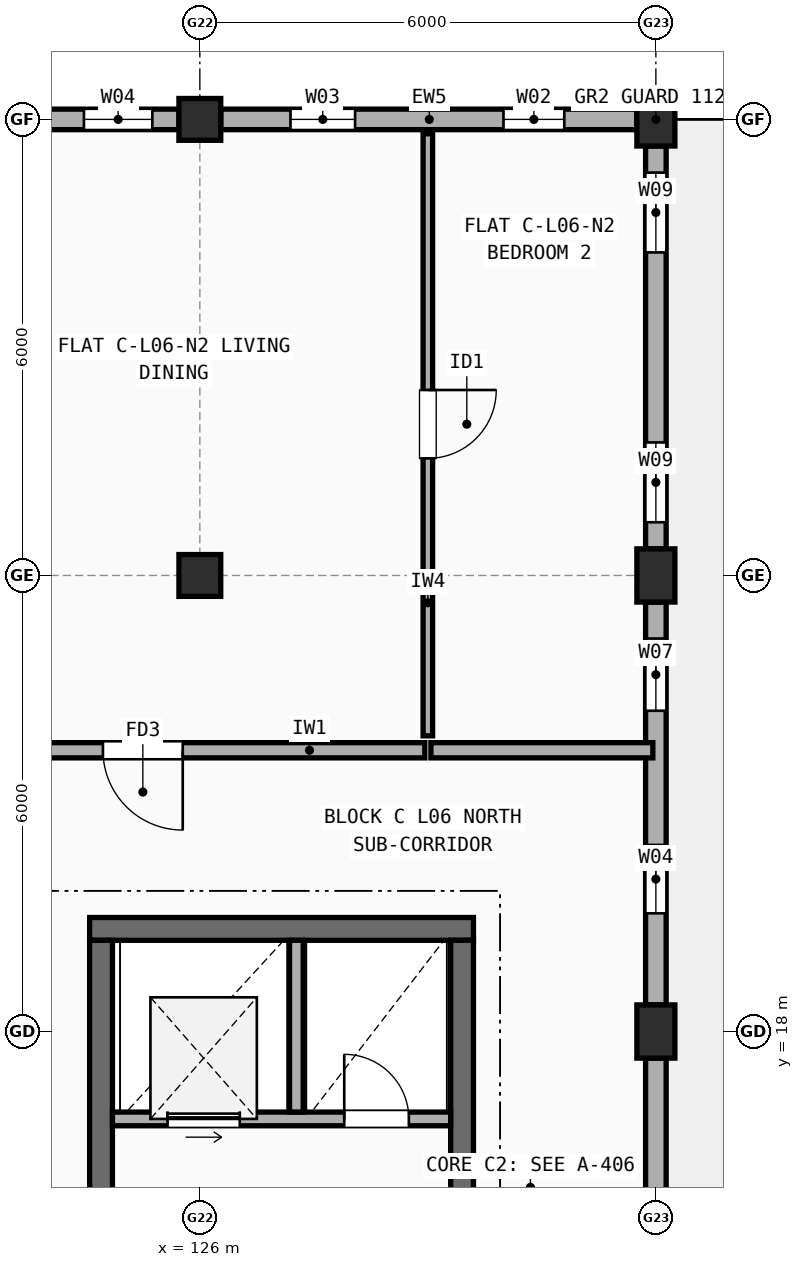
"""IFC4 building model, lengths in metres.
Left out: names, types, materials, properties, quantities, classifications, styles, units other than length and angle.
Written with IfcOpenShell. Run it as: python <this file> out.ifc"""

import sys

from ifc_helpers import new_model, si_unit, direction, frame, frame_2d, origin, origin_2d, place, context, subcontext, project, spatial, rectangle, extrude, element, fill, save


model = new_model("IFC4")
c1 = context("Model", 3, precision=1e-05, world=origin(), true_north=direction((0.0, 1.0)))
c2 = subcontext(c1, "Body", "Model", "MODEL_VIEW")
j1 = project(units=[si_unit("LENGTHUNIT", "METRE"), si_unit("PLANEANGLEUNIT", "RADIAN")], contexts=[c1])
p1 = place(None, origin())
s1 = spatial("IfcSite", under=j1, at=p1, CompositionType="ELEMENT")
p2 = place(p1, origin())
s2 = spatial("IfcBuilding", under=s1, at=p2, CompositionType="ELEMENT")
p3 = place(p2, frame((0.0, 0.0, 20.5)))
s3 = spatial("IfcBuildingStorey", under=s2, at=p3, CompositionType="ELEMENT", Elevation=20.5)
for number, where, z_axis, x_axis in (
    (1, (126.0, 24.0, 0.0), (0.0, 0.0, 1.0), (1.0, 0.0, 0.0)),
    (2, (126.0, 30.0, 0.0), (0.0, 0.0, 1.0), (1.0, 0.0, 0.0)),
):
    element("IfcColumn", number, at=place(p3, frame(where, z_axis=z_axis, x_axis=x_axis)), inside=s3, PredefinedType="COLUMN", context=c2, shape_type="SweptSolid", body=[
        extrude(rectangle(XDim=0.55, YDim=0.55, at=origin_2d()), origin(), (0.0, 0.0, 1.0), 2.97),
    ])
for number, where, z_axis, x_axis in (
    (3, (132.0, 18.0, 0.0), (0.0, 0.0, 1.0), (1.0, 0.0, 0.0)),
    (4, (132.0, 24.0, 0.0), (0.0, 0.0, 1.0), (1.0, 0.0, 0.0)),
    (5, (132.0, 30.0, 0.0), (0.0, 0.0, 1.0), (1.0, 0.0, 0.0)),
):
    element("IfcColumn", number, at=place(p3, frame(where, z_axis=z_axis, x_axis=x_axis)), inside=s3, PredefinedType="COLUMN", context=c2, shape_type="SweptSolid", body=[
        extrude(rectangle(XDim=0.5, YDim=0.7, at=origin_2d()), origin(), (0.0, 0.0, 1.0), 2.97),
    ])
p4 = place(p3, frame((132.0, 12.35, 0.0), z_axis=(0.0, 0.0, 1.0), x_axis=(0.0, 1.0, 0.0)))
e6 = element("IfcWall", 6, at=p4, inside=s3, PredefinedType="STANDARD", context=c2, shape_type="SweptSolid", body=[
    extrude(rectangle(XDim=5.3, YDim=0.27, at=frame_2d((2.65, 0.0))), origin(), (0.0, 0.0, 1.0), 2.452),
])
p5 = place(p4, frame((1.925, 0.0, 0.0)))
e7 = element("IfcOpeningElement", 7, at=p5, cuts=e6, PredefinedType="OPENING", context=c2, shape_type="SweptSolid", body=[
    extrude(rectangle(XDim=1.45, YDim=2.15, at=frame_2d((0.725, 1.075))), frame((0.0, 0.145, 0.0), z_axis=(0.0, -1.0, 0.0), x_axis=(1.0, 0.0, 0.0)), (0.0, 0.0, 1.0), 0.29),
])
p6 = place(p3, frame((132.0, 18.35, 0.0), z_axis=(0.0, 0.0, 1.0), x_axis=(0.0, 1.0, 0.0)))
e8 = element("IfcWall", 8, at=p6, inside=s3, PredefinedType="STANDARD", context=c2, shape_type="SweptSolid", body=[
    extrude(rectangle(XDim=5.3, YDim=0.27, at=frame_2d((2.65, 0.0))), origin(), (0.0, 0.0, 1.0), 2.452),
])
p7 = place(p6, frame((1.205, 0.0, 0.9)))
e9 = element("IfcOpeningElement", 9, at=p7, cuts=e8, PredefinedType="OPENING", context=c2, shape_type="SweptSolid", body=[
    extrude(rectangle(XDim=0.9, YDim=1.3, at=frame_2d((0.45, 0.65))), frame((0.0, 0.145, 0.0), z_axis=(0.0, -1.0, 0.0), x_axis=(1.0, 0.0, 0.0)), (0.0, 0.0, 1.0), 0.29),
])
p8 = place(p6, frame((3.87, 0.0, 0.9)))
e10 = element("IfcOpeningElement", 10, at=p8, cuts=e8, PredefinedType="OPENING", context=c2, shape_type="SweptSolid", body=[
    extrude(rectangle(XDim=0.95, YDim=1.35, at=frame_2d((0.475, 0.675))), frame((0.0, 0.145, 0.0), z_axis=(0.0, -1.0, 0.0), x_axis=(1.0, 0.0, 0.0)), (0.0, 0.0, 1.0), 0.29),
])
p9 = place(p3, frame((132.0, 24.35, 0.0), z_axis=(0.0, 0.0, 1.0), x_axis=(0.0, 1.0, 0.0)))
e11 = element("IfcWall", 11, at=p9, inside=s3, PredefinedType="STANDARD", context=c2, shape_type="SweptSolid", body=[
    extrude(rectangle(XDim=5.3, YDim=0.27, at=frame_2d((2.65, 0.0))), origin(), (0.0, 0.0, 1.0), 2.452),
])
p10 = place(p9, frame((0.35, 0.0, 0.9)))
e12 = element("IfcOpeningElement", 12, at=p10, cuts=e11, PredefinedType="OPENING", context=c2, shape_type="SweptSolid", body=[
    extrude(rectangle(XDim=1.05, YDim=1.35, at=frame_2d((0.525, 0.675))), frame((0.0, 0.145, 0.0), z_axis=(0.0, -1.0, 0.0), x_axis=(1.0, 0.0, 0.0)), (0.0, 0.0, 1.0), 0.29),
])
p11 = place(p9, frame((3.9, 0.0, 0.9)))
e13 = element("IfcOpeningElement", 13, at=p11, cuts=e11, PredefinedType="OPENING", context=c2, shape_type="SweptSolid", body=[
    extrude(rectangle(XDim=1.05, YDim=1.35, at=frame_2d((0.525, 0.675))), frame((0.0, 0.145, 0.0), z_axis=(0.0, -1.0, 0.0), x_axis=(1.0, 0.0, 0.0)), (0.0, 0.0, 1.0), 0.29),
])
p12 = place(p3, frame((131.75, 30.0, 0.0), z_axis=(0.0, 0.0, 1.0), x_axis=(-1.0, 0.0, 0.0)))
e14 = element("IfcWall", 14, at=p12, inside=s3, PredefinedType="STANDARD", context=c2, shape_type="SweptSolid", body=[
    extrude(rectangle(XDim=5.475, YDim=0.27, at=frame_2d((2.738, 0.0))), origin(), (0.0, 0.0, 1.0), 2.452),
])
p13 = place(p12, frame((0.955, 0.0, 0.9)))
e15 = element("IfcOpeningElement", 15, at=p13, cuts=e14, PredefinedType="OPENING", context=c2, shape_type="SweptSolid", body=[
    extrude(rectangle(XDim=0.8, YDim=1.2, at=frame_2d((0.4, 0.6))), frame((0.0, 0.145, 0.0), z_axis=(0.0, -1.0, 0.0), x_axis=(1.0, 0.0, 0.0)), (0.0, 0.0, 1.0), 0.29),
])
p14 = place(p12, frame((3.708, 0.0, 0.9)))
e16 = element("IfcOpeningElement", 16, at=p14, cuts=e14, PredefinedType="OPENING", context=c2, shape_type="SweptSolid", body=[
    extrude(rectangle(XDim=0.85, YDim=1.25, at=frame_2d((0.425, 0.625))), frame((0.0, 0.145, 0.0), z_axis=(0.0, -1.0, 0.0), x_axis=(1.0, 0.0, 0.0)), (0.0, 0.0, 1.0), 0.29),
])
p15 = place(p3, frame((125.725, 30.0, 0.0), z_axis=(0.0, 0.0, 1.0), x_axis=(-1.0, 0.0, 0.0)))
e17 = element("IfcWall", 17, at=p15, inside=s3, PredefinedType="STANDARD", context=c2, shape_type="SweptSolid", body=[
    extrude(rectangle(XDim=5.45, YDim=0.27, at=frame_2d((2.725, 0.0))), origin(), (0.0, 0.0, 1.0), 2.452),
])
p16 = place(p15, frame((0.35, 0.0, 0.9)))
e18 = element("IfcOpeningElement", 18, at=p16, cuts=e17, PredefinedType="OPENING", context=c2, shape_type="SweptSolid", body=[
    extrude(rectangle(XDim=0.9, YDim=1.3, at=frame_2d((0.45, 0.65))), frame((0.0, 0.145, 0.0), z_axis=(0.0, -1.0, 0.0), x_axis=(1.0, 0.0, 0.0)), (0.0, 0.0, 1.0), 0.29),
])
p17 = place(p15, frame((2.935, 0.0, 0.9)))
e19 = element("IfcOpeningElement", 19, at=p17, cuts=e17, PredefinedType="OPENING", context=c2, shape_type="SweptSolid", body=[
    extrude(rectangle(XDim=0.9, YDim=1.3, at=frame_2d((0.45, 0.65))), frame((0.0, 0.145, 0.0), z_axis=(0.0, -1.0, 0.0), x_axis=(1.0, 0.0, 0.0)), (0.0, 0.0, 1.0), 0.29),
])
p18 = place(p3, frame((129.6, 19.35, 0.0), z_axis=(0.0, 0.0, 1.0), x_axis=(-1.0, 0.0, 0.0)))
e20 = element("IfcWall", 20, at=p18, inside=s3, PredefinedType="SHEAR", context=c2, shape_type="SweptSolid", body=[
    extrude(rectangle(XDim=5.05, YDim=0.3, at=frame_2d((2.525, 0.0))), origin(), (0.0, 0.0, 1.0), 2.97),
])
p19 = place(p3, frame((129.45, 12.75, 0.0), z_axis=(0.0, 0.0, 1.0), x_axis=(0.0, 1.0, 0.0)))
e21 = element("IfcWall", 21, at=p19, inside=s3, PredefinedType="SHEAR", context=c2, shape_type="SweptSolid", body=[
    extrude(rectangle(XDim=6.45, YDim=0.3, at=frame_2d((3.225, 0.0))), origin(), (0.0, 0.0, 1.0), 2.97),
])
p20 = place(p3, frame((124.7, 15.65, 0.0), z_axis=(0.0, 0.0, 1.0), x_axis=(0.0, 1.0, 0.0)))
e22 = element("IfcWall", 22, at=p20, inside=s3, PredefinedType="SHEAR", context=c2, shape_type="SweptSolid", body=[
    extrude(rectangle(XDim=3.55, YDim=0.3, at=frame_2d((1.775, 0.0))), origin(), (0.0, 0.0, 1.0), 2.97),
])
p21 = place(p3, frame((124.85, 16.85, 0.0), z_axis=(0.0, 0.0, 1.0), x_axis=(1.0, 0.0, 0.0)))
e23 = element("IfcWall", 23, at=p21, inside=s3, PredefinedType="SOLIDWALL", context=c2, shape_type="SweptSolid", body=[
    extrude(rectangle(XDim=4.45, YDim=0.18, at=frame_2d((2.225, 0.0))), origin(), (0.0, 0.0, 1.0), 2.97),
])
p22 = place(p21, frame((0.725, 0.0, 0.0)))
e24 = element("IfcOpeningElement", 24, at=p22, cuts=e23, PredefinedType="OPENING", context=c2, shape_type="SweptSolid", body=[
    extrude(rectangle(XDim=0.95, YDim=2.15, at=frame_2d((0.475, 1.075))), frame((0.0, 0.1, 0.0), z_axis=(0.0, -1.0, 0.0), x_axis=(1.0, 0.0, 0.0)), (0.0, 0.0, 1.0), 0.2),
])
p23 = place(p21, frame((3.05, 0.0, 0.0)))
e25 = element("IfcOpeningElement", 25, at=p23, cuts=e23, PredefinedType="OPENING", context=c2, shape_type="SweptSolid", body=[
    extrude(rectangle(XDim=0.85, YDim=2.1, at=frame_2d((0.425, 1.05))), frame((0.0, 0.1, 0.0), z_axis=(0.0, -1.0, 0.0), x_axis=(1.0, 0.0, 0.0)), (0.0, 0.0, 1.0), 0.2),
])
p24 = place(p3, frame((127.27, 16.94, 0.0), z_axis=(0.0, 0.0, 1.0), x_axis=(0.0, 1.0, 0.0)))
e26 = element("IfcWall", 26, at=p24, inside=s3, PredefinedType="SOLIDWALL", context=c2, shape_type="SweptSolid", body=[
    extrude(rectangle(XDim=2.26, YDim=0.18, at=frame_2d((1.13, 0.0))), origin(), (0.0, 0.0, 1.0), 2.97),
])
p25 = place(p3, frame((121.54, 21.7, 0.0), z_axis=(0.0, 0.0, 1.0), x_axis=(1.0, 0.0, 0.0)))
e27 = element("IfcWall", 27, at=p25, inside=s3, PredefinedType="SOLIDWALL", context=c2, shape_type="SweptSolid", body=[
    extrude(rectangle(XDim=7.42, YDim=0.2, at=frame_2d((3.71, 0.0))), origin(), (0.0, 0.0, 1.0), 2.97),
])
p26 = place(p25, frame((3.185, 0.0, 0.0)))
e28 = element("IfcOpeningElement", 28, at=p26, cuts=e27, PredefinedType="OPENING", context=c2, shape_type="SweptSolid", body=[
    extrude(rectangle(XDim=1.05, YDim=2.15, at=frame_2d((0.525, 1.075))), frame((0.0, 0.11, 0.0), z_axis=(0.0, -1.0, 0.0), x_axis=(1.0, 0.0, 0.0)), (0.0, 0.0, 1.0), 0.22),
])
p27 = place(p3, frame((129.04, 21.7, 0.0), z_axis=(0.0, 0.0, 1.0), x_axis=(1.0, 0.0, 0.0)))
e29 = element("IfcWall", 29, at=p27, inside=s3, PredefinedType="SOLIDWALL", context=c2, shape_type="SweptSolid", body=[
    extrude(rectangle(XDim=2.92, YDim=0.2, at=frame_2d((1.46, 0.0))), origin(), (0.0, 0.0, 1.0), 2.452),
])
p28 = place(p3, frame((129.0, 21.89, 0.0), z_axis=(0.0, 0.0, 1.0), x_axis=(0.0, 1.0, 0.0)))
e30 = element("IfcWall", 30, at=p28, inside=s3, PredefinedType="PARTITIONING", context=c2, shape_type="SweptSolid", body=[
    extrude(rectangle(XDim=7.92, YDim=0.125, at=frame_2d((3.96, 0.0))), origin(), (0.0, 0.0, 1.0), 2.508),
])
p29 = place(p28, frame((3.65, 0.0, 0.0)))
e31 = element("IfcOpeningElement", 31, at=p29, cuts=e30, PredefinedType="OPENING", context=c2, shape_type="SweptSolid", body=[
    extrude(rectangle(XDim=0.9, YDim=2.1, at=frame_2d((0.45, 1.05))), frame((0.0, 0.073, 0.0), z_axis=(0.0, -1.0, 0.0), x_axis=(1.0, 0.0, 0.0)), (0.0, 0.0, 1.0), 0.145),
])
p30 = place(p7, origin())
e32 = element("IfcWindow", 32, at=p30, inside=s3, PartitioningType="SINGLE_PANEL", PredefinedType="WINDOW", context=c2, shape_type="SweptSolid", body=[
    extrude(rectangle(XDim=0.9, YDim=1.3, at=frame_2d((0.45, 0.65))), frame((0.0, 0.03, 0.0), z_axis=(0.0, -1.0, 0.0), x_axis=(1.0, 0.0, 0.0)), (0.0, 0.0, 1.0), 0.06),
])
fill(e9, e32)
p31 = place(p8, origin())
e33 = element("IfcWindow", 33, at=p31, inside=s3, PartitioningType="SINGLE_PANEL", PredefinedType="WINDOW", context=c2, shape_type="SweptSolid", body=[
    extrude(rectangle(XDim=0.95, YDim=1.35, at=frame_2d((0.475, 0.675))), frame((0.0, 0.03, 0.0), z_axis=(0.0, -1.0, 0.0), x_axis=(1.0, 0.0, 0.0)), (0.0, 0.0, 1.0), 0.06),
])
fill(e10, e33)
p32 = place(p10, origin())
e34 = element("IfcWindow", 34, at=p32, inside=s3, PartitioningType="SINGLE_PANEL", PredefinedType="WINDOW", context=c2, shape_type="SweptSolid", body=[
    extrude(rectangle(XDim=1.05, YDim=1.35, at=frame_2d((0.525, 0.675))), frame((0.0, 0.03, 0.0), z_axis=(0.0, -1.0, 0.0), x_axis=(1.0, 0.0, 0.0)), (0.0, 0.0, 1.0), 0.06),
])
fill(e12, e34)
p33 = place(p11, origin())
e35 = element("IfcWindow", 35, at=p33, inside=s3, PartitioningType="SINGLE_PANEL", PredefinedType="WINDOW", context=c2, shape_type="SweptSolid", body=[
    extrude(rectangle(XDim=1.05, YDim=1.35, at=frame_2d((0.525, 0.675))), frame((0.0, 0.03, 0.0), z_axis=(0.0, -1.0, 0.0), x_axis=(1.0, 0.0, 0.0)), (0.0, 0.0, 1.0), 0.06),
])
fill(e13, e35)
p34 = place(p13, origin())
e36 = element("IfcWindow", 36, at=p34, inside=s3, PartitioningType="SINGLE_PANEL", PredefinedType="WINDOW", context=c2, shape_type="SweptSolid", body=[
    extrude(rectangle(XDim=0.8, YDim=1.2, at=frame_2d((0.4, 0.6))), frame((0.0, 0.03, 0.0), z_axis=(0.0, -1.0, 0.0), x_axis=(1.0, 0.0, 0.0)), (0.0, 0.0, 1.0), 0.06),
])
fill(e15, e36)
p35 = place(p14, origin())
e37 = element("IfcWindow", 37, at=p35, inside=s3, PartitioningType="SINGLE_PANEL", PredefinedType="WINDOW", context=c2, shape_type="SweptSolid", body=[
    extrude(rectangle(XDim=0.85, YDim=1.25, at=frame_2d((0.425, 0.625))), frame((0.0, 0.03, 0.0), z_axis=(0.0, -1.0, 0.0), x_axis=(1.0, 0.0, 0.0)), (0.0, 0.0, 1.0), 0.06),
])
fill(e16, e37)
p36 = place(p16, origin())
e38 = element("IfcWindow", 38, at=p36, inside=s3, PartitioningType="SINGLE_PANEL", PredefinedType="WINDOW", context=c2, shape_type="SweptSolid", body=[
    extrude(rectangle(XDim=0.9, YDim=1.3, at=frame_2d((0.45, 0.65))), frame((0.0, 0.03, 0.0), z_axis=(0.0, -1.0, 0.0), x_axis=(1.0, 0.0, 0.0)), (0.0, 0.0, 1.0), 0.06),
])
fill(e18, e38)
p37 = place(p22, origin())
e39 = element("IfcDoor", 39, at=p37, inside=s3, OperationType="SLIDING_TO_LEFT", PredefinedType="DOOR", context=c2, shape_type="SweptSolid", body=[
    extrude(rectangle(XDim=0.95, YDim=2.15, at=frame_2d((0.475, 1.075))), frame((0.0, 0.025, 0.0), z_axis=(0.0, -1.0, 0.0), x_axis=(1.0, 0.0, 0.0)), (0.0, 0.0, 1.0), 0.05),
])
fill(e24, e39)
p38 = place(p23, frame((0.85, 0.0, 0.0), z_axis=(0.0, 0.0, 1.0), x_axis=(-1.0, 0.0, 0.0)))
e40 = element("IfcDoor", 40, at=p38, inside=s3, OperationType="SINGLE_SWING_LEFT", PredefinedType="DOOR", context=c2, shape_type="SweptSolid", body=[
    extrude(rectangle(XDim=0.85, YDim=2.1, at=frame_2d((0.425, 1.05))), frame((0.0, 0.025, 0.0), z_axis=(0.0, -1.0, 0.0), x_axis=(1.0, 0.0, 0.0)), (0.0, 0.0, 1.0), 0.05),
])
fill(e25, e40)
p39 = place(p26, origin())
e41 = element("IfcDoor", 41, at=p39, inside=s3, OperationType="SINGLE_SWING_RIGHT", PredefinedType="DOOR", context=c2, shape_type="SweptSolid", body=[
    extrude(rectangle(XDim=1.05, YDim=2.15, at=frame_2d((0.525, 1.075))), frame((0.0, 0.025, 0.0), z_axis=(0.0, -1.0, 0.0), x_axis=(1.0, 0.0, 0.0)), (0.0, 0.0, 1.0), 0.05),
])
fill(e28, e41)
p40 = place(p29, origin())
e42 = element("IfcDoor", 42, at=p40, inside=s3, OperationType="SINGLE_SWING_RIGHT", PredefinedType="DOOR", context=c2, shape_type="SweptSolid", body=[
    extrude(rectangle(XDim=0.9, YDim=2.1, at=frame_2d((0.45, 1.05))), frame((0.0, 0.025, 0.0), z_axis=(0.0, -1.0, 0.0), x_axis=(1.0, 0.0, 0.0)), (0.0, 0.0, 1.0), 0.05),
])
fill(e31, e42)
save(model, sys.argv[1])
